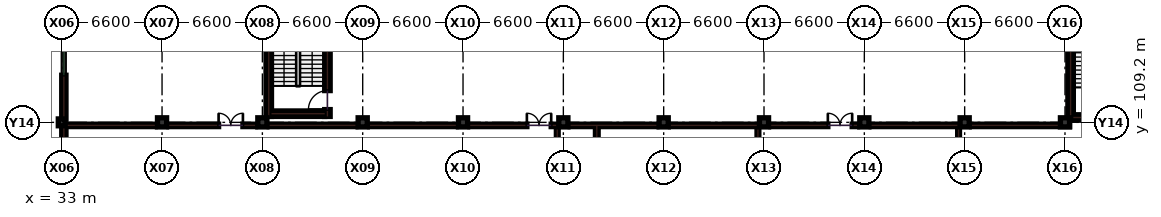
"""IFC4 building model, lengths in metres.
Left out: names, types, materials, properties, quantities, classifications, styles, units other than length and angle.
Written with IfcOpenShell. Run it as: python <this file> out.ifc"""

import sys

from ifc_helpers import new_model, si_unit, direction, frame, frame_2d, origin, origin_2d, place, context, subcontext, project, spatial, rectangle, extrude, element, fill, save


model = new_model("IFC4")
c1 = context("Model", 3, precision=1e-05, world=origin(), true_north=direction((0.0, 1.0)))
c2 = subcontext(c1, "Body", "Model", "MODEL_VIEW")
j1 = project(units=[si_unit("LENGTHUNIT", "METRE"), si_unit("PLANEANGLEUNIT", "RADIAN")], contexts=[c1])
p1 = place(None, origin())
s1 = spatial("IfcSite", under=j1, at=p1, CompositionType="ELEMENT")
p2 = place(p1, origin())
s2 = spatial("IfcBuilding", under=s1, at=p2, CompositionType="ELEMENT")
p3 = place(p2, frame((0.0, 0.0, 14.4)))
s3 = spatial("IfcBuildingStorey", under=s2, at=p3, CompositionType="ELEMENT", Elevation=14.4)
p4 = place(p3, frame((33.0, 109.2, 0.0), z_axis=(0.0, 0.0, 1.0), x_axis=(1.0, 0.0, 0.0)))
e1 = element("IfcColumn", 1, at=p4, inside=s3, PredefinedType="COLUMN", context=c2, shape_type="SweptSolid", body=[
    extrude(rectangle(XDim=0.45, YDim=0.45, at=origin_2d()), origin(), (0.0, 0.0, 1.0), 4.2),
])
for number, where, z_axis, x_axis in (
    (2, (39.6, 109.2, 0.0), (0.0, 0.0, 1.0), (1.0, 0.0, 0.0)),
    (3, (46.2, 109.2, 0.0), (0.0, 0.0, 1.0), (1.0, 0.0, 0.0)),
    (4, (52.8, 109.2, 0.0), (0.0, 0.0, 1.0), (1.0, 0.0, 0.0)),
    (5, (59.4, 109.2, 0.0), (0.0, 0.0, 1.0), (1.0, 0.0, 0.0)),
    (6, (66.0, 109.2, 0.0), (0.0, 0.0, 1.0), (1.0, 0.0, 0.0)),
    (7, (72.6, 109.2, 0.0), (0.0, 0.0, 1.0), (1.0, 0.0, 0.0)),
    (8, (79.2, 109.2, 0.0), (0.0, 0.0, 1.0), (1.0, 0.0, 0.0)),
    (9, (85.8, 109.2, 0.0), (0.0, 0.0, 1.0), (1.0, 0.0, 0.0)),
    (10, (92.4, 109.2, 0.0), (0.0, 0.0, 1.0), (1.0, 0.0, 0.0)),
    (11, (99.0, 109.2, 0.0), (0.0, 0.0, 1.0), (1.0, 0.0, 0.0)),
):
    element("IfcColumn", number, at=place(p3, frame(where, z_axis=z_axis, x_axis=x_axis)), inside=s3, PredefinedType="COLUMN", context=c2, shape_type="SweptSolid", body=[
        extrude(rectangle(XDim=0.6, YDim=0.6, at=origin_2d()), origin(), (0.0, 0.0, 1.0), 4.2),
    ])
p5 = place(p3, frame((33.32, 109.0, 0.0), z_axis=(0.0, 0.0, 1.0), x_axis=(1.0, 0.0, 0.0)))
e12 = element("IfcWall", 12, at=p5, inside=s3, PredefinedType="PARTITIONING", context=c2, shape_type="SweptSolid", body=[
    extrude(rectangle(XDim=5.83, YDim=0.16, at=frame_2d((2.915, 0.0))), origin(), (0.0, 0.0, 1.0), 3.175),
])
p6 = place(p3, frame((40.05, 109.0, 0.0), z_axis=(0.0, 0.0, 1.0), x_axis=(1.0, 0.0, 0.0)))
e13 = element("IfcWall", 13, at=p6, inside=s3, PredefinedType="PARTITIONING", context=c2, shape_type="SweptSolid", body=[
    extrude(rectangle(XDim=5.7, YDim=0.16, at=frame_2d((2.85, 0.0))), origin(), (0.0, 0.0, 1.0), 3.175),
])
p7 = place(p6, frame((3.27, 0.0, 0.0)))
e14 = element("IfcOpeningElement", 14, at=p7, cuts=e13, PredefinedType="OPENING", context=c2, shape_type="SweptSolid", body=[
    extrude(rectangle(XDim=1.6, YDim=2.2, at=frame_2d((0.8, 1.1))), frame((0.0, 0.09, 0.0), z_axis=(0.0, -1.0, 0.0), x_axis=(1.0, 0.0, 0.0)), (0.0, 0.0, 1.0), 0.18),
])
p8 = place(p3, frame((46.65, 109.0, 0.0), z_axis=(0.0, 0.0, 1.0), x_axis=(1.0, 0.0, 0.0)))
e15 = element("IfcWall", 15, at=p8, inside=s3, PredefinedType="PARTITIONING", context=c2, shape_type="SweptSolid", body=[
    extrude(rectangle(XDim=5.7, YDim=0.16, at=frame_2d((2.85, 0.0))), origin(), (0.0, 0.0, 1.0), 3.175),
])
p9 = place(p3, frame((53.25, 109.0, 0.0), z_axis=(0.0, 0.0, 1.0), x_axis=(1.0, 0.0, 0.0)))
e16 = element("IfcWall", 16, at=p9, inside=s3, PredefinedType="PARTITIONING", context=c2, shape_type="SweptSolid", body=[
    extrude(rectangle(XDim=5.7, YDim=0.16, at=frame_2d((2.85, 0.0))), origin(), (0.0, 0.0, 1.0), 3.175),
])
p10 = place(p3, frame((59.85, 109.0, 0.0), z_axis=(0.0, 0.0, 1.0), x_axis=(1.0, 0.0, 0.0)))
e17 = element("IfcWall", 17, at=p10, inside=s3, PredefinedType="PARTITIONING", context=c2, shape_type="SweptSolid", body=[
    extrude(rectangle(XDim=5.7, YDim=0.16, at=frame_2d((2.85, 0.0))), origin(), (0.0, 0.0, 1.0), 3.175),
])
p11 = place(p10, frame((3.75, 0.0, 0.0)))
e18 = element("IfcOpeningElement", 18, at=p11, cuts=e17, PredefinedType="OPENING", context=c2, shape_type="SweptSolid", body=[
    extrude(rectangle(XDim=1.6, YDim=2.2, at=frame_2d((0.8, 1.1))), frame((0.0, 0.09, 0.0), z_axis=(0.0, -1.0, 0.0), x_axis=(1.0, 0.0, 0.0)), (0.0, 0.0, 1.0), 0.18),
])
for number, where, z_axis, x_axis in (
    (19, (66.45, 109.0, 0.0), (0.0, 0.0, 1.0), (1.0, 0.0, 0.0)),
    (20, (73.05, 109.0, 0.0), (0.0, 0.0, 1.0), (1.0, 0.0, 0.0)),
):
    element("IfcWall", number, at=place(p3, frame(where, z_axis=z_axis, x_axis=x_axis)), inside=s3, PredefinedType="PARTITIONING", context=c2, shape_type="SweptSolid", body=[
        extrude(rectangle(XDim=5.7, YDim=0.16, at=frame_2d((2.85, 0.0))), origin(), (0.0, 0.0, 1.0), 3.175),
    ])
p12 = place(p3, frame((79.65, 109.0, 0.0), z_axis=(0.0, 0.0, 1.0), x_axis=(1.0, 0.0, 0.0)))
e21 = element("IfcWall", 21, at=p12, inside=s3, PredefinedType="PARTITIONING", context=c2, shape_type="SweptSolid", body=[
    extrude(rectangle(XDim=5.7, YDim=0.16, at=frame_2d((2.85, 0.0))), origin(), (0.0, 0.0, 1.0), 3.175),
])
p13 = place(p12, frame((3.75, 0.0, 0.0)))
e22 = element("IfcOpeningElement", 22, at=p13, cuts=e21, PredefinedType="OPENING", context=c2, shape_type="SweptSolid", body=[
    extrude(rectangle(XDim=1.6, YDim=2.2, at=frame_2d((0.8, 1.1))), frame((0.0, 0.09, 0.0), z_axis=(0.0, -1.0, 0.0), x_axis=(1.0, 0.0, 0.0)), (0.0, 0.0, 1.0), 0.18),
])
p14 = place(p3, frame((86.25, 109.0, 0.0), z_axis=(0.0, 0.0, 1.0), x_axis=(1.0, 0.0, 0.0)))
e23 = element("IfcWall", 23, at=p14, inside=s3, PredefinedType="PARTITIONING", context=c2, shape_type="SweptSolid", body=[
    extrude(rectangle(XDim=5.7, YDim=0.16, at=frame_2d((2.85, 0.0))), origin(), (0.0, 0.0, 1.0), 3.175),
])
p15 = place(p3, frame((92.85, 109.0, 0.0), z_axis=(0.0, 0.0, 1.0), x_axis=(1.0, 0.0, 0.0)))
e24 = element("IfcWall", 24, at=p15, inside=s3, PredefinedType="PARTITIONING", context=c2, shape_type="SweptSolid", body=[
    extrude(rectangle(XDim=6.45, YDim=0.16, at=frame_2d((3.225, 0.0))), origin(), (0.0, 0.0, 1.0), 3.175),
])
p16 = place(p3, frame((68.2, 100.8, 0.0), z_axis=(0.0, 0.0, 1.0), x_axis=(0.0, 1.0, 0.0)))
e25 = element("IfcWall", 25, at=p16, inside=s3, PredefinedType="SOLIDWALL", context=c2, shape_type="SweptSolid", body=[
    extrude(rectangle(XDim=8.2, YDim=0.18, at=frame_2d((4.1, 0.0))), origin(), (0.0, 0.0, 1.0), 3.19),
])
p17 = place(p3, frame((65.6, 101.0, 0.0), z_axis=(0.0, 0.0, 1.0), x_axis=(0.0, 1.0, 0.0)))
e26 = element("IfcWall", 26, at=p17, inside=s3, PredefinedType="PARTITIONING", context=c2, shape_type="SweptSolid", body=[
    extrude(rectangle(XDim=8.0, YDim=0.12, at=frame_2d((4.0, 0.0))), origin(), (0.0, 0.0, 1.0), 3.19),
])
p18 = place(p17, frame((3.8, 0.0, 0.0)))
e27 = element("IfcOpeningElement", 27, at=p18, cuts=e26, PredefinedType="OPENING", context=c2, shape_type="SweptSolid", body=[
    extrude(rectangle(XDim=1.75, YDim=2.3, at=frame_2d((0.875, 1.15))), frame((0.0, 0.07, 0.0), z_axis=(0.0, -1.0, 0.0), x_axis=(1.0, 0.0, 0.0)), (0.0, 0.0, 1.0), 0.14),
])
p19 = place(p3, frame((78.8, 101.0, 0.0), z_axis=(0.0, 0.0, 1.0), x_axis=(0.0, 1.0, 0.0)))
e28 = element("IfcWall", 28, at=p19, inside=s3, PredefinedType="PARTITIONING", context=c2, shape_type="SweptSolid", body=[
    extrude(rectangle(XDim=8.0, YDim=0.12, at=frame_2d((4.0, 0.0))), origin(), (0.0, 0.0, 1.0), 3.19),
])
p20 = place(p19, frame((3.8, 0.0, 0.0)))
e29 = element("IfcOpeningElement", 29, at=p20, cuts=e28, PredefinedType="OPENING", context=c2, shape_type="SweptSolid", body=[
    extrude(rectangle(XDim=1.95, YDim=2.35, at=frame_2d((0.975, 1.175))), frame((0.0, 0.07, 0.0), z_axis=(0.0, -1.0, 0.0), x_axis=(1.0, 0.0, 0.0)), (0.0, 0.0, 1.0), 0.14),
])
p21 = place(p3, frame((92.0, 101.0, 0.0), z_axis=(0.0, 0.0, 1.0), x_axis=(0.0, 1.0, 0.0)))
e30 = element("IfcWall", 30, at=p21, inside=s3, PredefinedType="PARTITIONING", context=c2, shape_type="SweptSolid", body=[
    extrude(rectangle(XDim=8.0, YDim=0.12, at=frame_2d((4.0, 0.0))), origin(), (0.0, 0.0, 1.0), 3.19),
])
p22 = place(p21, frame((3.8, 0.0, 0.0)))
e31 = element("IfcOpeningElement", 31, at=p22, cuts=e30, PredefinedType="OPENING", context=c2, shape_type="SweptSolid", body=[
    extrude(rectangle(XDim=0.9, YDim=2.1, at=frame_2d((0.45, 1.05))), frame((0.0, 0.07, 0.0), z_axis=(0.0, -1.0, 0.0), x_axis=(1.0, 0.0, 0.0)), (0.0, 0.0, 1.0), 0.14),
])
p23 = place(p3, frame((33.14, 108.98, 0.0), z_axis=(0.0, 0.0, 1.0), x_axis=(0.0, -1.0, 0.0)))
e32 = element("IfcWall", 32, at=p23, inside=s3, PredefinedType="SOLIDWALL", context=c2, shape_type="SweptSolid", body=[
    extrude(rectangle(XDim=7.96, YDim=0.28, at=frame_2d((3.98, 0.0))), origin(), (0.0, 0.0, 1.0), 3.225),
])
p24 = place(p23, frame((3.03, 0.0, 0.95)))
e33 = element("IfcOpeningElement", 33, at=p24, cuts=e32, PredefinedType="OPENING", context=c2, shape_type="SweptSolid", body=[
    extrude(rectangle(XDim=1.9, YDim=1.85, at=frame_2d((0.95, 0.925))), frame((0.0, 0.15, 0.0), z_axis=(0.0, -1.0, 0.0), x_axis=(1.0, 0.0, 0.0)), (0.0, 0.0, 1.0), 0.3),
])
p25 = place(p3, frame((33.14, 117.38, 0.0), z_axis=(0.0, 0.0, 1.0), x_axis=(0.0, -1.0, 0.0)))
e34 = element("IfcWall", 34, at=p25, inside=s3, PredefinedType="SOLIDWALL", context=c2, shape_type="SweptSolid", body=[
    extrude(rectangle(XDim=7.96, YDim=0.28, at=frame_2d((3.98, 0.0))), origin(), (0.0, 0.0, 1.0), 3.375),
])
p26 = place(p25, frame((2.88, 0.0, 0.95)))
e35 = element("IfcOpeningElement", 35, at=p26, cuts=e34, PredefinedType="OPENING", context=c2, shape_type="SweptSolid", body=[
    extrude(rectangle(XDim=2.2, YDim=1.85, at=frame_2d((1.1, 0.925))), frame((0.0, 0.15, 0.0), z_axis=(0.0, -1.0, 0.0), x_axis=(1.0, 0.0, 0.0)), (0.0, 0.0, 1.0), 0.3),
])
p27 = place(p3, frame((99.37, 109.34, 0.0), z_axis=(0.0, 0.0, 1.0), x_axis=(0.0, 1.0, 0.0)))
e36 = element("IfcWall", 36, at=p27, inside=s3, PredefinedType="SHEAR", context=c2, shape_type="SweptSolid", body=[
    extrude(rectangle(XDim=8.09, YDim=0.36, at=frame_2d((4.045, 0.0))), origin(), (0.0, 0.0, 1.0), 3.94),
])
p28 = place(p3, frame((99.55, 109.52, 0.0), z_axis=(0.0, 0.0, 1.0), x_axis=(1.0, 0.0, 0.0)))
e37 = element("IfcWall", 37, at=p28, inside=s3, PredefinedType="SHEAR", context=c2, shape_type="SweptSolid", body=[
    extrude(rectangle(XDim=3.8, YDim=0.36, at=frame_2d((1.9, 0.0))), origin(), (0.0, 0.0, 1.0), 3.94),
])
p29 = place(p3, frame((46.62, 109.59, 0.0), z_axis=(0.0, 0.0, 1.0), x_axis=(0.0, 1.0, 0.0)))
e38 = element("IfcWall", 38, at=p29, inside=s3, PredefinedType="SHEAR", context=c2, shape_type="SweptSolid", body=[
    extrude(rectangle(XDim=7.84, YDim=0.36, at=frame_2d((3.92, 0.0))), origin(), (0.0, 0.0, 1.0), 3.94),
])
p30 = place(p3, frame((50.48, 109.59, 0.0), z_axis=(0.0, 0.0, 1.0), x_axis=(0.0, 1.0, 0.0)))
e39 = element("IfcWall", 39, at=p30, inside=s3, PredefinedType="SHEAR", context=c2, shape_type="SweptSolid", body=[
    extrude(rectangle(XDim=7.84, YDim=0.36, at=frame_2d((3.92, 0.0))), origin(), (0.0, 0.0, 1.0), 3.94),
])
p31 = place(p30, frame((0.45, 0.0, 0.0)))
e40 = element("IfcOpeningElement", 40, at=p31, cuts=e39, PredefinedType="OPENING", context=c2, shape_type="SweptSolid", body=[
    extrude(rectangle(XDim=1.25, YDim=2.15, at=frame_2d((0.625, 1.075))), frame((0.0, 0.19, 0.0), z_axis=(0.0, -1.0, 0.0), x_axis=(1.0, 0.0, 0.0)), (0.0, 0.0, 1.0), 0.38),
])
p32 = place(p3, frame((46.8, 109.77, 0.0), z_axis=(0.0, 0.0, 1.0), x_axis=(1.0, 0.0, 0.0)))
e41 = element("IfcWall", 41, at=p32, inside=s3, PredefinedType="SHEAR", context=c2, shape_type="SweptSolid", body=[
    extrude(rectangle(XDim=3.5, YDim=0.36, at=frame_2d((1.75, 0.0))), origin(), (0.0, 0.0, 1.0), 3.94),
])
p33 = place(p7, origin())
e42 = element("IfcDoor", 42, at=p33, inside=s3, OperationType="DOUBLE_DOOR_SINGLE_SWING", PredefinedType="DOOR", context=c2, shape_type="SweptSolid", body=[
    extrude(rectangle(XDim=1.6, YDim=2.2, at=frame_2d((0.8, 1.1))), frame((0.0, 0.025, 0.0), z_axis=(0.0, -1.0, 0.0), x_axis=(1.0, 0.0, 0.0)), (0.0, 0.0, 1.0), 0.05),
])
fill(e14, e42)
p34 = place(p11, origin())
e43 = element("IfcDoor", 43, at=p34, inside=s3, OperationType="DOUBLE_DOOR_SINGLE_SWING", PredefinedType="DOOR", context=c2, shape_type="SweptSolid", body=[
    extrude(rectangle(XDim=1.6, YDim=2.2, at=frame_2d((0.8, 1.1))), frame((0.0, 0.025, 0.0), z_axis=(0.0, -1.0, 0.0), x_axis=(1.0, 0.0, 0.0)), (0.0, 0.0, 1.0), 0.05),
])
fill(e18, e43)
p35 = place(p13, origin())
e44 = element("IfcDoor", 44, at=p35, inside=s3, OperationType="DOUBLE_DOOR_SINGLE_SWING", PredefinedType="DOOR", context=c2, shape_type="SweptSolid", body=[
    extrude(rectangle(XDim=1.6, YDim=2.2, at=frame_2d((0.8, 1.1))), frame((0.0, 0.025, 0.0), z_axis=(0.0, -1.0, 0.0), x_axis=(1.0, 0.0, 0.0)), (0.0, 0.0, 1.0), 0.05),
])
fill(e22, e44)
p36 = place(p26, origin())
e45 = element("IfcWindow", 45, at=p36, inside=s3, PartitioningType="SINGLE_PANEL", PredefinedType="WINDOW", context=c2, shape_type="SweptSolid", body=[
    extrude(rectangle(XDim=2.2, YDim=1.85, at=frame_2d((1.1, 0.925))), frame((0.0, 0.03, 0.0), z_axis=(0.0, -1.0, 0.0), x_axis=(1.0, 0.0, 0.0)), (0.0, 0.0, 1.0), 0.06),
])
fill(e35, e45)
p37 = place(p31, origin())
e46 = element("IfcDoor", 46, at=p37, inside=s3, OperationType="SINGLE_SWING_LEFT", PredefinedType="DOOR", context=c2, shape_type="SweptSolid", body=[
    extrude(rectangle(XDim=1.25, YDim=2.15, at=frame_2d((0.625, 1.075))), frame((0.0, 0.025, 0.0), z_axis=(0.0, -1.0, 0.0), x_axis=(1.0, 0.0, 0.0)), (0.0, 0.0, 1.0), 0.05),
])
fill(e40, e46)
save(model, sys.argv[1])
